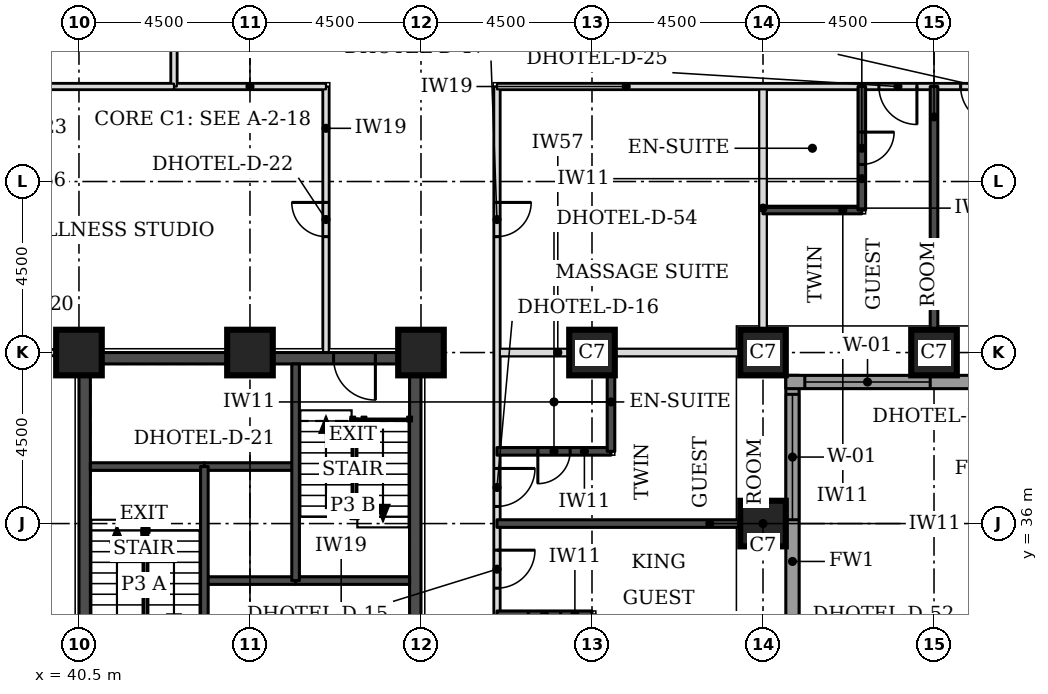
"""IFC4 building model, lengths in metres.
Left out: names, types, materials, properties, quantities, classifications, styles, units other than length and angle.
Written with IfcOpenShell. Run it as: python <this file> out.ifc"""

import sys

from ifc_helpers import new_model, si_unit, direction, frame, frame_2d, origin, origin_2d, place, context, subcontext, project, spatial, rectangle, extrude, element, fill, save


model = new_model("IFC4")
c1 = context("Model", 3, precision=1e-05, world=origin(), true_north=direction((0.0, 1.0)))
c2 = subcontext(c1, "Body", "Model", "MODEL_VIEW")
j1 = project(units=[si_unit("LENGTHUNIT", "METRE"), si_unit("PLANEANGLEUNIT", "RADIAN")], contexts=[c1])
p1 = place(None, origin())
s1 = spatial("IfcSite", under=j1, at=p1, CompositionType="ELEMENT")
p2 = place(p1, origin())
s2 = spatial("IfcBuilding", under=s1, at=p2, CompositionType="ELEMENT")
p3 = place(p2, frame((0.0, 0.0, 59.4)))
s3 = spatial("IfcBuildingStorey", under=s2, at=p3, CompositionType="ELEMENT", Elevation=59.4)
for number, where, z_axis, x_axis in (
    (1, (58.5, 36.0, 0.0), (0.0, 0.0, 1.0), (1.0, 0.0, 0.0)),
    (2, (40.5, 40.5, 0.0), (0.0, 0.0, 1.0), (1.0, 0.0, 0.0)),
    (3, (45.0, 40.5, 0.0), (0.0, 0.0, 1.0), (1.0, 0.0, 0.0)),
    (4, (49.5, 40.5, 0.0), (0.0, 0.0, 1.0), (1.0, 0.0, 0.0)),
    (5, (54.0, 40.5, 0.0), (0.0, 0.0, 1.0), (1.0, 0.0, 0.0)),
    (6, (58.5, 40.5, 0.0), (0.0, 0.0, 1.0), (1.0, 0.0, 0.0)),
    (7, (63.0, 40.5, 0.0), (0.0, 0.0, 1.0), (1.0, 0.0, 0.0)),
):
    element("IfcColumn", number, at=place(p3, frame(where, z_axis=z_axis, x_axis=x_axis)), inside=s3, PredefinedType="COLUMN", context=c2, shape_type="SweptSolid", body=[
        extrude(rectangle(XDim=1.2, YDim=1.2, at=origin_2d()), origin(), (0.0, 0.0, 1.0), 3.3),
    ])
p4 = place(p3, frame((40.8, 40.35, 0.0), z_axis=(0.0, 0.0, 1.0), x_axis=(1.0, 0.0, 0.0)))
e8 = element("IfcWall", 8, at=p4, inside=s3, PredefinedType="SHEAR", context=c2, shape_type="SweptSolid", body=[
    extrude(rectangle(XDim=8.4, YDim=0.3, at=frame_2d((4.2, 0.0))), origin(), (0.0, 0.0, 1.0), 3.3),
])
p5 = place(p4, frame((6.4, 0.0, 0.0)))
e9 = element("IfcOpeningElement", 9, at=p5, cuts=e8, PredefinedType="OPENING", context=c2, shape_type="SweptSolid", body=[
    extrude(rectangle(XDim=1.1, YDim=2.1, at=frame_2d((0.55, 1.05))), frame((0.0, 0.16, 0.0), z_axis=(0.0, -1.0, 0.0), x_axis=(1.0, 0.0, 0.0)), (0.0, 0.0, 1.0), 0.32),
])
p6 = place(p3, frame((40.65, 31.5, 0.0), z_axis=(0.0, 0.0, 1.0), x_axis=(0.0, 1.0, 0.0)))
e10 = element("IfcWall", 10, at=p6, inside=s3, PredefinedType="SHEAR", context=c2, shape_type="SweptSolid", body=[
    extrude(rectangle(XDim=9.0, YDim=0.3, at=frame_2d((4.5, 0.0))), origin(), (0.0, 0.0, 1.0), 3.3),
])
p7 = place(p6, frame((0.4, 0.0, 0.0)))
e11 = element("IfcOpeningElement", 11, at=p7, cuts=e10, PredefinedType="OPENING", context=c2, shape_type="SweptSolid", body=[
    extrude(rectangle(XDim=1.1, YDim=2.1, at=frame_2d((0.55, 1.05))), frame((0.0, 0.16, 0.0), z_axis=(0.0, -1.0, 0.0), x_axis=(1.0, 0.0, 0.0)), (0.0, 0.0, 1.0), 0.32),
])
p8 = place(p3, frame((49.35, 31.5, 0.0), z_axis=(0.0, 0.0, 1.0), x_axis=(0.0, 1.0, 0.0)))
e12 = element("IfcWall", 12, at=p8, inside=s3, PredefinedType="SHEAR", context=c2, shape_type="SweptSolid", body=[
    extrude(rectangle(XDim=9.0, YDim=0.3, at=frame_2d((4.5, 0.0))), origin(), (0.0, 0.0, 1.0), 3.3),
])
p9 = place(p3, frame((59.275, 22.106, 0.0), z_axis=(0.0, 0.0, 1.0), x_axis=(0.0, 1.0, 0.0)))
e13 = element("IfcWall", 13, at=p9, inside=s3, PredefinedType="STANDARD", context=c2, shape_type="SweptSolid", body=[
    extrude(rectangle(XDim=17.793, YDim=0.35, at=frame_2d((8.897, 0.0))), origin(), (0.0, 0.0, 1.0), 3.055),
])
p10 = place(p9, frame((5.493, 0.0, 0.8)))
e14 = element("IfcOpeningElement", 14, at=p10, cuts=e13, PredefinedType="OPENING", context=c2, shape_type="SweptSolid", body=[
    extrude(rectangle(XDim=3.3, YDim=1.5, at=frame_2d((1.65, 0.75))), frame((0.0, 0.185, 0.0), z_axis=(0.0, -1.0, 0.0), x_axis=(1.0, 0.0, 0.0)), (0.0, 0.0, 1.0), 0.37),
])
p11 = place(p9, frame((13.993, 0.0, 0.8)))
e15 = element("IfcOpeningElement", 15, at=p11, cuts=e13, PredefinedType="OPENING", context=c2, shape_type="SweptSolid", body=[
    extrude(rectangle(XDim=3.3, YDim=1.5, at=frame_2d((1.65, 0.75))), frame((0.0, 0.185, 0.0), z_axis=(0.0, -1.0, 0.0), x_axis=(1.0, 0.0, 0.0)), (0.0, 0.0, 1.0), 0.37),
])
p12 = place(p3, frame((59.1, 39.725, 0.0), z_axis=(0.0, 0.0, 1.0), x_axis=(1.0, 0.0, 0.0)))
e16 = element("IfcWall", 16, at=p12, inside=s3, PredefinedType="STANDARD", context=c2, shape_type="SweptSolid", body=[
    extrude(rectangle(XDim=13.293, YDim=0.35, at=frame_2d((6.647, 0.0))), origin(), (0.0, 0.0, 1.0), 3.055),
])
p13 = place(p12, frame((0.5, 0.0, 0.8)))
e17 = element("IfcOpeningElement", 17, at=p13, cuts=e16, PredefinedType="OPENING", context=c2, shape_type="SweptSolid", body=[
    extrude(rectangle(XDim=3.3, YDim=1.5, at=frame_2d((1.65, 0.75))), frame((0.0, 0.185, 0.0), z_axis=(0.0, -1.0, 0.0), x_axis=(1.0, 0.0, 0.0)), (0.0, 0.0, 1.0), 0.37),
])
p14 = place(p3, frame((51.5, 40.5, 0.0), z_axis=(0.0, 0.0, 1.0), x_axis=(1.0, 0.0, 0.0)))
e18 = element("IfcWall", 18, at=p14, inside=s3, PredefinedType="PARTITIONING", context=c2, shape_type="SweptSolid", body=[
    extrude(rectangle(XDim=6.4, YDim=0.2, at=frame_2d((3.2, 0.0))), origin(), (0.0, 0.0, 1.0), 2.33),
])
p15 = place(p3, frame((58.5, 41.1, 0.0), z_axis=(0.0, 0.0, 1.0), x_axis=(0.0, 1.0, 0.0)))
e19 = element("IfcWall", 19, at=p15, inside=s3, PredefinedType="PARTITIONING", context=c2, shape_type="SweptSolid", body=[
    extrude(rectangle(XDim=6.4, YDim=0.2, at=frame_2d((3.2, 0.0))), origin(), (0.0, 0.0, 1.0), 3.08),
])
p16 = place(p3, frame((51.5, 25.15, 0.0), z_axis=(0.0, 0.0, 1.0), x_axis=(0.0, 1.0, 0.0)))
e20 = element("IfcWall", 20, at=p16, inside=s3, PredefinedType="PARTITIONING", context=c2, shape_type="SweptSolid", body=[
    extrude(rectangle(XDim=22.35, YDim=0.15, at=frame_2d((11.175, 0.0))), origin(), (0.0, 0.0, 1.0), 3.08),
])
p17 = place(p16, frame((0.347, 0.0, 0.0)))
e21 = element("IfcOpeningElement", 21, at=p17, cuts=e20, PredefinedType="OPENING", context=c2, shape_type="SweptSolid", body=[
    extrude(rectangle(XDim=1.0, YDim=2.1, at=frame_2d((0.5, 1.05))), frame((0.0, 0.085, 0.0), z_axis=(0.0, -1.0, 0.0), x_axis=(1.0, 0.0, 0.0)), (0.0, 0.0, 1.0), 0.17),
])
p18 = place(p16, frame((2.3, 0.0, 0.0)))
e22 = element("IfcOpeningElement", 22, at=p18, cuts=e20, PredefinedType="OPENING", context=c2, shape_type="SweptSolid", body=[
    extrude(rectangle(XDim=1.0, YDim=2.1, at=frame_2d((0.5, 1.05))), frame((0.0, 0.085, 0.0), z_axis=(0.0, -1.0, 0.0), x_axis=(1.0, 0.0, 0.0)), (0.0, 0.0, 1.0), 0.17),
])
p19 = place(p16, frame((9.15, 0.0, 0.0)))
e23 = element("IfcOpeningElement", 23, at=p19, cuts=e20, PredefinedType="OPENING", context=c2, shape_type="SweptSolid", body=[
    extrude(rectangle(XDim=1.0, YDim=2.1, at=frame_2d((0.5, 1.05))), frame((0.0, 0.085, 0.0), z_axis=(0.0, -1.0, 0.0), x_axis=(1.0, 0.0, 0.0)), (0.0, 0.0, 1.0), 0.17),
])
p20 = place(p16, frame((11.3, 0.0, 0.0)))
e24 = element("IfcOpeningElement", 24, at=p20, cuts=e20, PredefinedType="OPENING", context=c2, shape_type="SweptSolid", body=[
    extrude(rectangle(XDim=1.0, YDim=2.1, at=frame_2d((0.5, 1.05))), frame((0.0, 0.085, 0.0), z_axis=(0.0, -1.0, 0.0), x_axis=(1.0, 0.0, 0.0)), (0.0, 0.0, 1.0), 0.17),
])
p21 = place(p16, frame((18.4, 0.0, 0.0)))
e25 = element("IfcOpeningElement", 25, at=p21, cuts=e20, PredefinedType="OPENING", context=c2, shape_type="SweptSolid", body=[
    extrude(rectangle(XDim=0.9, YDim=2.1, at=frame_2d((0.45, 1.05))), frame((0.0, 0.085, 0.0), z_axis=(0.0, -1.0, 0.0), x_axis=(1.0, 0.0, 0.0)), (0.0, 0.0, 1.0), 0.17),
])
p22 = place(p3, frame((38.5, 40.5, 0.0), z_axis=(0.0, 0.0, 1.0), x_axis=(1.0, 0.0, 0.0)))
e26 = element("IfcWall", 26, at=p22, inside=s3, PredefinedType="PARTITIONING", context=c2, shape_type="SweptSolid", body=[
    extrude(rectangle(XDim=1.95, YDim=0.15, at=frame_2d((0.975, 0.0))), origin(), (0.0, 0.0, 1.0), 2.33),
])
p23 = place(p3, frame((47.0, 40.5, 0.0), z_axis=(0.0, 0.0, 1.0), x_axis=(0.0, 1.0, 0.0)))
e27 = element("IfcWall", 27, at=p23, inside=s3, PredefinedType="PARTITIONING", context=c2, shape_type="SweptSolid", body=[
    extrude(rectangle(XDim=7.0, YDim=0.15, at=frame_2d((3.5, 0.0))), origin(), (0.0, 0.0, 1.0), 3.08),
])
p24 = place(p23, frame((3.05, 0.0, 0.0)))
e28 = element("IfcOpeningElement", 28, at=p24, cuts=e27, PredefinedType="OPENING", context=c2, shape_type="SweptSolid", body=[
    extrude(rectangle(XDim=0.9, YDim=2.1, at=frame_2d((0.45, 1.05))), frame((0.0, 0.085, 0.0), z_axis=(0.0, -1.0, 0.0), x_axis=(1.0, 0.0, 0.0)), (0.0, 0.0, 1.0), 0.17),
])
p25 = place(p3, frame((43.0, 47.5, 0.0), z_axis=(0.0, 0.0, 1.0), x_axis=(1.0, 0.0, 0.0)))
e29 = element("IfcWall", 29, at=p25, inside=s3, PredefinedType="PARTITIONING", context=c2, shape_type="SweptSolid", body=[
    extrude(rectangle(XDim=4.0, YDim=0.15, at=frame_2d((2.0, 0.0))), origin(), (0.0, 0.0, 1.0), 3.08),
])
p26 = place(p3, frame((43.0, 47.5, 0.0), z_axis=(0.0, 0.0, 1.0), x_axis=(0.0, 1.0, 0.0)))
e30 = element("IfcWall", 30, at=p26, inside=s3, PredefinedType="PARTITIONING", context=c2, shape_type="SweptSolid", body=[
    extrude(rectangle(XDim=7.85, YDim=0.15, at=frame_2d((3.925, 0.0))), origin(), (0.0, 0.0, 1.0), 3.08),
])
p27 = place(p26, frame((3.475, 0.0, 0.0)))
e31 = element("IfcOpeningElement", 31, at=p27, cuts=e30, PredefinedType="OPENING", context=c2, shape_type="SweptSolid", body=[
    extrude(rectangle(XDim=0.9, YDim=2.1, at=frame_2d((0.45, 1.05))), frame((0.0, 0.085, 0.0), z_axis=(0.0, -1.0, 0.0), x_axis=(1.0, 0.0, 0.0)), (0.0, 0.0, 1.0), 0.17),
])
p28 = place(p3, frame((51.5, 47.5, 0.0), z_axis=(0.0, 0.0, 1.0), x_axis=(1.0, 0.0, 0.0)))
e32 = element("IfcWall", 32, at=p28, inside=s3, PredefinedType="PARTITIONING", context=c2, shape_type="SweptSolid", body=[
    extrude(rectangle(XDim=18.0, YDim=0.15, at=frame_2d((9.0, 0.0))), origin(), (0.0, 0.0, 1.0), 3.08),
])
p29 = place(p28, frame((12.2, 0.0, 0.0)))
e33 = element("IfcOpeningElement", 33, at=p29, cuts=e32, PredefinedType="OPENING", context=c2, shape_type="SweptSolid", body=[
    extrude(rectangle(XDim=1.0, YDim=2.1, at=frame_2d((0.5, 1.05))), frame((0.0, 0.085, 0.0), z_axis=(0.0, -1.0, 0.0), x_axis=(1.0, 0.0, 0.0)), (0.0, 0.0, 1.0), 0.17),
])
p30 = place(p28, frame((10.05, 0.0, 0.0)))
e34 = element("IfcOpeningElement", 34, at=p30, cuts=e32, PredefinedType="OPENING", context=c2, shape_type="SweptSolid", body=[
    extrude(rectangle(XDim=1.0, YDim=2.1, at=frame_2d((0.5, 1.05))), frame((0.0, 0.085, 0.0), z_axis=(0.0, -1.0, 0.0), x_axis=(1.0, 0.0, 0.0)), (0.0, 0.0, 1.0), 0.17),
])
p31 = place(p28, frame((16.5, 0.0, 0.0)))
e35 = element("IfcOpeningElement", 35, at=p31, cuts=e32, PredefinedType="OPENING", context=c2, shape_type="SweptSolid", body=[
    extrude(rectangle(XDim=1.0, YDim=2.1, at=frame_2d((0.5, 1.05))), frame((0.0, 0.085, 0.0), z_axis=(0.0, -1.0, 0.0), x_axis=(1.0, 0.0, 0.0)), (0.0, 0.0, 1.0), 0.17),
])
p32 = place(p3, frame((51.5, 33.6, 0.0), z_axis=(0.0, 0.0, 1.0), x_axis=(1.0, 0.0, 0.0)))
e36 = element("IfcWall", 36, at=p32, inside=s3, PredefinedType="SOLIDWALL", context=c2, shape_type="SweptSolid", body=[
    extrude(rectangle(XDim=2.5, YDim=0.2, at=frame_2d((1.25, 0.0))), origin(), (0.0, 0.0, 1.0), 3.08),
])
p33 = place(p32, frame((0.825, 0.0, 0.0)))
e37 = element("IfcOpeningElement", 37, at=p33, cuts=e36, PredefinedType="OPENING", context=c2, shape_type="SweptSolid", body=[
    extrude(rectangle(XDim=0.85, YDim=2.1, at=frame_2d((0.425, 1.05))), frame((0.0, 0.11, 0.0), z_axis=(0.0, -1.0, 0.0), x_axis=(1.0, 0.0, 0.0)), (0.0, 0.0, 1.0), 0.22),
])
p34 = place(p3, frame((51.5, 36.0, 0.0), z_axis=(0.0, 0.0, 1.0), x_axis=(1.0, 0.0, 0.0)))
e38 = element("IfcWall", 38, at=p34, inside=s3, PredefinedType="SOLIDWALL", context=c2, shape_type="SweptSolid", body=[
    extrude(rectangle(XDim=6.4, YDim=0.2, at=frame_2d((3.2, 0.0))), origin(), (0.0, 0.0, 1.0), 3.08),
])
p35 = place(p3, frame((51.5, 37.9, 0.0), z_axis=(0.0, 0.0, 1.0), x_axis=(1.0, 0.0, 0.0)))
e39 = element("IfcWall", 39, at=p35, inside=s3, PredefinedType="SOLIDWALL", context=c2, shape_type="SweptSolid", body=[
    extrude(rectangle(XDim=3.0, YDim=0.2, at=frame_2d((1.5, 0.0))), origin(), (0.0, 0.0, 1.0), 3.08),
])
p36 = place(p35, frame((1.075, 0.0, 0.0)))
e40 = element("IfcOpeningElement", 40, at=p36, cuts=e39, PredefinedType="OPENING", context=c2, shape_type="SweptSolid", body=[
    extrude(rectangle(XDim=0.85, YDim=2.1, at=frame_2d((0.425, 1.05))), frame((0.0, 0.11, 0.0), z_axis=(0.0, -1.0, 0.0), x_axis=(1.0, 0.0, 0.0)), (0.0, 0.0, 1.0), 0.22),
])
p37 = place(p3, frame((54.5, 37.9, 0.0), z_axis=(0.0, 0.0, 1.0), x_axis=(0.0, 1.0, 0.0)))
e41 = element("IfcWall", 41, at=p37, inside=s3, PredefinedType="SOLIDWALL", context=c2, shape_type="SweptSolid", body=[
    extrude(rectangle(XDim=2.6, YDim=0.2, at=frame_2d((1.3, 0.0))), origin(), (0.0, 0.0, 1.0), 3.08),
])
p38 = place(p3, frame((63.0, 41.1, 0.0), z_axis=(0.0, 0.0, 1.0), x_axis=(0.0, 1.0, 0.0)))
e42 = element("IfcWall", 42, at=p38, inside=s3, PredefinedType="SOLIDWALL", context=c2, shape_type="SweptSolid", body=[
    extrude(rectangle(XDim=6.4, YDim=0.2, at=frame_2d((3.2, 0.0))), origin(), (0.0, 0.0, 1.0), 3.08),
])
p39 = place(p3, frame((58.5, 44.25, 0.0), z_axis=(0.0, 0.0, 1.0), x_axis=(1.0, 0.0, 0.0)))
e43 = element("IfcWall", 43, at=p39, inside=s3, PredefinedType="SOLIDWALL", context=c2, shape_type="SweptSolid", body=[
    extrude(rectangle(XDim=2.6, YDim=0.2, at=frame_2d((1.3, 0.0))), origin(), (0.0, 0.0, 1.0), 3.08),
])
p40 = place(p3, frame((61.1, 44.25, 0.0), z_axis=(0.0, 0.0, 1.0), x_axis=(0.0, 1.0, 0.0)))
e44 = element("IfcWall", 44, at=p40, inside=s3, PredefinedType="SOLIDWALL", context=c2, shape_type="SweptSolid", body=[
    extrude(rectangle(XDim=3.25, YDim=0.2, at=frame_2d((1.625, 0.0))), origin(), (0.0, 0.0, 1.0), 3.08),
])
p41 = place(p40, frame((1.2, 0.0, 0.0)))
e45 = element("IfcOpeningElement", 45, at=p41, cuts=e44, PredefinedType="OPENING", context=c2, shape_type="SweptSolid", body=[
    extrude(rectangle(XDim=0.85, YDim=2.1, at=frame_2d((0.425, 1.05))), frame((0.0, 0.11, 0.0), z_axis=(0.0, -1.0, 0.0), x_axis=(1.0, 0.0, 0.0)), (0.0, 0.0, 1.0), 0.22),
])
p42 = place(p3, frame((36.0, 47.5, 0.0), z_axis=(0.0, 0.0, 1.0), x_axis=(1.0, 0.0, 0.0)))
e46 = element("IfcWall", 46, at=p42, inside=s3, PredefinedType="PARTITIONING", context=c2, shape_type="SweptSolid", body=[
    extrude(rectangle(XDim=7.0, YDim=0.15, at=frame_2d((3.5, 0.0))), origin(), (0.0, 0.0, 1.0), 3.08),
])
p43 = place(p3, frame((43.8, 34.5, 0.0), z_axis=(0.0, 0.0, 1.0), x_axis=(1.0, 0.0, 0.0)))
e47 = element("IfcWall", 47, at=p43, inside=s3, PredefinedType="SOLIDWALL", context=c2, shape_type="SweptSolid", body=[
    extrude(rectangle(XDim=2.4, YDim=0.2, at=frame_2d((1.2, 0.0))), origin(), (0.0, 0.0, 1.0), 3.08),
])
p44 = place(p3, frame((46.2, 34.5, 0.0), z_axis=(0.0, 0.0, 1.0), x_axis=(1.0, 0.0, 0.0)))
e48 = element("IfcWall", 48, at=p44, inside=s3, PredefinedType="SOLIDWALL", context=c2, shape_type="SweptSolid", body=[
    extrude(rectangle(XDim=3.0, YDim=0.2, at=frame_2d((1.5, 0.0))), origin(), (0.0, 0.0, 1.0), 3.08),
])
p45 = place(p3, frame((43.8, 37.5, 0.0), z_axis=(0.0, 0.0, 1.0), x_axis=(1.0, 0.0, 0.0)))
e49 = element("IfcWall", 49, at=p45, inside=s3, PredefinedType="SOLIDWALL", context=c2, shape_type="SweptSolid", body=[
    extrude(rectangle(XDim=2.4, YDim=0.2, at=frame_2d((1.2, 0.0))), origin(), (0.0, 0.0, 1.0), 3.3),
])
p46 = place(p3, frame((40.8, 37.5, 0.0), z_axis=(0.0, 0.0, 1.0), x_axis=(1.0, 0.0, 0.0)))
e50 = element("IfcWall", 50, at=p46, inside=s3, PredefinedType="SOLIDWALL", context=c2, shape_type="SweptSolid", body=[
    extrude(rectangle(XDim=3.0, YDim=0.2, at=frame_2d((1.5, 0.0))), origin(), (0.0, 0.0, 1.0), 3.08),
])
for number, where, z_axis, x_axis in (
    (51, (43.8, 31.8, 0.0), (0.0, 0.0, 1.0), (0.0, 1.0, 0.0)),
    (52, (46.2, 34.5, 0.0), (0.0, 0.0, 1.0), (0.0, 1.0, 0.0)),
):
    element("IfcWall", number, at=place(p3, frame(where, z_axis=z_axis, x_axis=x_axis)), inside=s3, PredefinedType="SOLIDWALL", context=c2, shape_type="SweptSolid", body=[
        extrude(rectangle(XDim=5.7, YDim=0.2, at=frame_2d((2.85, 0.0))), origin(), (0.0, 0.0, 1.0), 3.08),
    ])
p47 = place(p11, origin())
e53 = element("IfcWindow", 53, at=p47, inside=s3, PartitioningType="SINGLE_PANEL", PredefinedType="WINDOW", context=c2, shape_type="SweptSolid", body=[
    extrude(rectangle(XDim=3.3, YDim=1.5, at=frame_2d((1.65, 0.75))), frame((0.0, 0.085, 0.0), z_axis=(0.0, -1.0, 0.0), x_axis=(1.0, 0.0, 0.0)), (0.0, 0.0, 1.0), 0.06),
])
fill(e15, e53)
p48 = place(p13, origin())
e54 = element("IfcWindow", 54, at=p48, inside=s3, PartitioningType="SINGLE_PANEL", PredefinedType="WINDOW", context=c2, shape_type="SweptSolid", body=[
    extrude(rectangle(XDim=3.3, YDim=1.5, at=frame_2d((1.65, 0.75))), frame((0.0, 0.085, 0.0), z_axis=(0.0, -1.0, 0.0), x_axis=(1.0, 0.0, 0.0)), (0.0, 0.0, 1.0), 0.06),
])
fill(e17, e54)
p49 = place(p19, frame((1.0, 0.0, 0.0), z_axis=(0.0, 0.0, 1.0), x_axis=(-1.0, 0.0, 0.0)))
e55 = element("IfcDoor", 55, at=p49, inside=s3, OperationType="SINGLE_SWING_LEFT", PredefinedType="DOOR", context=c2, shape_type="SweptSolid", body=[
    extrude(rectangle(XDim=1.0, YDim=2.1, at=frame_2d((0.5, 1.05))), frame((0.0, 0.025, 0.0), z_axis=(0.0, -1.0, 0.0), x_axis=(1.0, 0.0, 0.0)), (0.0, 0.0, 1.0), 0.05),
])
fill(e23, e55)
p50 = place(p33, frame((0.85, 0.0, 0.0), z_axis=(0.0, 0.0, 1.0), x_axis=(-1.0, 0.0, 0.0)))
e56 = element("IfcDoor", 56, at=p50, inside=s3, OperationType="SINGLE_SWING_RIGHT", PredefinedType="DOOR", context=c2, shape_type="SweptSolid", body=[
    extrude(rectangle(XDim=0.85, YDim=2.1, at=frame_2d((0.425, 1.05))), frame((0.0, 0.025, 0.0), z_axis=(0.0, -1.0, 0.0), x_axis=(1.0, 0.0, 0.0)), (0.0, 0.0, 1.0), 0.05),
])
fill(e37, e56)
p51 = place(p20, frame((1.0, 0.0, 0.0), z_axis=(0.0, 0.0, 1.0), x_axis=(-1.0, 0.0, 0.0)))
e57 = element("IfcDoor", 57, at=p51, inside=s3, OperationType="SINGLE_SWING_LEFT", PredefinedType="DOOR", context=c2, shape_type="SweptSolid", body=[
    extrude(rectangle(XDim=1.0, YDim=2.1, at=frame_2d((0.5, 1.05))), frame((0.0, 0.025, 0.0), z_axis=(0.0, -1.0, 0.0), x_axis=(1.0, 0.0, 0.0)), (0.0, 0.0, 1.0), 0.05),
])
fill(e24, e57)
p52 = place(p36, frame((0.85, 0.0, 0.0), z_axis=(0.0, 0.0, 1.0), x_axis=(-1.0, 0.0, 0.0)))
e58 = element("IfcDoor", 58, at=p52, inside=s3, OperationType="SINGLE_SWING_RIGHT", PredefinedType="DOOR", context=c2, shape_type="SweptSolid", body=[
    extrude(rectangle(XDim=0.85, YDim=2.1, at=frame_2d((0.425, 1.05))), frame((0.0, 0.025, 0.0), z_axis=(0.0, -1.0, 0.0), x_axis=(1.0, 0.0, 0.0)), (0.0, 0.0, 1.0), 0.05),
])
fill(e40, e58)
p53 = place(p29, frame((1.0, 0.0, 0.0), z_axis=(0.0, 0.0, 1.0), x_axis=(-1.0, 0.0, 0.0)))
e59 = element("IfcDoor", 59, at=p53, inside=s3, OperationType="SINGLE_SWING_LEFT", PredefinedType="DOOR", context=c2, shape_type="SweptSolid", body=[
    extrude(rectangle(XDim=1.0, YDim=2.1, at=frame_2d((0.5, 1.05))), frame((0.0, 0.025, 0.0), z_axis=(0.0, -1.0, 0.0), x_axis=(1.0, 0.0, 0.0)), (0.0, 0.0, 1.0), 0.05),
])
fill(e33, e59)
p54 = place(p30, frame((1.0, 0.0, 0.0), z_axis=(0.0, 0.0, 1.0), x_axis=(-1.0, 0.0, 0.0)))
e60 = element("IfcDoor", 60, at=p54, inside=s3, OperationType="SINGLE_SWING_LEFT", PredefinedType="DOOR", context=c2, shape_type="SweptSolid", body=[
    extrude(rectangle(XDim=1.0, YDim=2.1, at=frame_2d((0.5, 1.05))), frame((0.0, 0.025, 0.0), z_axis=(0.0, -1.0, 0.0), x_axis=(1.0, 0.0, 0.0)), (0.0, 0.0, 1.0), 0.05),
])
fill(e34, e60)
p55 = place(p41, frame((0.85, 0.0, 0.0), z_axis=(0.0, 0.0, 1.0), x_axis=(-1.0, 0.0, 0.0)))
e61 = element("IfcDoor", 61, at=p55, inside=s3, OperationType="SINGLE_SWING_LEFT", PredefinedType="DOOR", context=c2, shape_type="SweptSolid", body=[
    extrude(rectangle(XDim=0.85, YDim=2.1, at=frame_2d((0.425, 1.05))), frame((0.0, 0.025, 0.0), z_axis=(0.0, -1.0, 0.0), x_axis=(1.0, 0.0, 0.0)), (0.0, 0.0, 1.0), 0.05),
])
fill(e45, e61)
p56 = place(p24, origin())
e62 = element("IfcDoor", 62, at=p56, inside=s3, OperationType="SINGLE_SWING_RIGHT", PredefinedType="DOOR", context=c2, shape_type="SweptSolid", body=[
    extrude(rectangle(XDim=0.9, YDim=2.1, at=frame_2d((0.45, 1.05))), frame((0.0, 0.025, 0.0), z_axis=(0.0, -1.0, 0.0), x_axis=(1.0, 0.0, 0.0)), (0.0, 0.0, 1.0), 0.05),
])
fill(e28, e62)
p57 = place(p21, frame((0.9, 0.0, 0.0), z_axis=(0.0, 0.0, 1.0), x_axis=(-1.0, 0.0, 0.0)))
e63 = element("IfcDoor", 63, at=p57, inside=s3, OperationType="SINGLE_SWING_LEFT", PredefinedType="DOOR", context=c2, shape_type="SweptSolid", body=[
    extrude(rectangle(XDim=0.9, YDim=2.1, at=frame_2d((0.45, 1.05))), frame((0.0, 0.025, 0.0), z_axis=(0.0, -1.0, 0.0), x_axis=(1.0, 0.0, 0.0)), (0.0, 0.0, 1.0), 0.05),
])
fill(e25, e63)
p58 = place(p5, frame((1.1, 0.0, 0.0), z_axis=(0.0, 0.0, 1.0), x_axis=(-1.0, 0.0, 0.0)))
e64 = element("IfcDoor", 64, at=p58, inside=s3, OperationType="SINGLE_SWING_LEFT", PredefinedType="DOOR", context=c2, shape_type="SweptSolid", body=[
    extrude(rectangle(XDim=1.1, YDim=2.1, at=frame_2d((0.55, 1.05))), frame((0.0, 0.025, 0.0), z_axis=(0.0, -1.0, 0.0), x_axis=(1.0, 0.0, 0.0)), (0.0, 0.0, 1.0), 0.05),
])
fill(e9, e64)
save(model, sys.argv[1])
